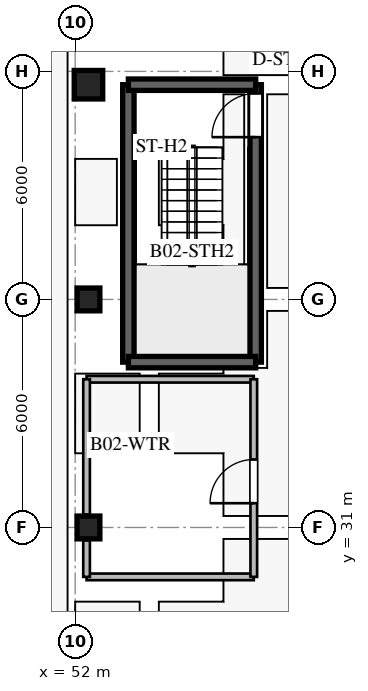
"""IFC4 building model, lengths in metres.
Left out: names, types, materials, properties, quantities, classifications, styles, units other than length and angle.
Written with IfcOpenShell. Run it as: python <this file> out.ifc"""

import sys

from ifc_helpers import new_model, si_unit, direction, frame, frame_2d, origin, origin_2d, place, context, subcontext, project, spatial, rectangle, extrude, element, fill, save


model = new_model("IFC4")
c1 = context("Model", 3, precision=1e-05, world=origin(), true_north=direction((0.0, 1.0)))
c2 = subcontext(c1, "Body", "Model", "MODEL_VIEW")
j1 = project(units=[si_unit("LENGTHUNIT", "METRE"), si_unit("PLANEANGLEUNIT", "RADIAN")], contexts=[c1])
p1 = place(None, origin())
s1 = spatial("IfcSite", under=j1, at=p1, CompositionType="ELEMENT")
p2 = place(p1, origin())
s2 = spatial("IfcBuilding", under=s1, at=p2, CompositionType="ELEMENT")
p3 = place(p2, frame((0.0, 0.0, -8.4)))
s3 = spatial("IfcBuildingStorey", under=s2, at=p3, CompositionType="ELEMENT", Elevation=-8.4)
p4 = place(p3, frame((56.75, 35.35, 0.0), z_axis=(0.0, 0.0, 1.0), x_axis=(0.0, 1.0, 0.0)))
e1 = element("IfcWall", 1, at=p4, inside=s3, PredefinedType="SOLIDWALL", context=c2, shape_type="SweptSolid", body=[
    extrude(rectangle(XDim=7.3, YDim=0.3, at=frame_2d((3.65, 0.0))), origin(), (0.0, 0.0, 1.0), 3.88),
])
p5 = place(p4, frame((5.92, 0.0, 0.0)))
e2 = element("IfcOpeningElement", 2, at=p5, cuts=e1, PredefinedType="OPENING", context=c2, shape_type="SweptSolid", body=[
    extrude(rectangle(XDim=1.15, YDim=2.2, at=frame_2d((0.575, 1.1))), frame((0.0, 0.16, 0.0), z_axis=(0.0, -1.0, 0.0), x_axis=(1.0, 0.0, 0.0)), (0.0, 0.0, 1.0), 0.32),
])
p6 = place(p3, frame((53.4, 35.35, 0.0), z_axis=(0.0, 0.0, 1.0), x_axis=(0.0, 1.0, 0.0)))
e3 = element("IfcWall", 3, at=p6, inside=s3, PredefinedType="SOLIDWALL", context=c2, shape_type="SweptSolid", body=[
    extrude(rectangle(XDim=7.3, YDim=0.3, at=frame_2d((3.65, 0.0))), origin(), (0.0, 0.0, 1.0), 3.88),
])
for number, where, z_axis, x_axis in (
    (4, (53.4, 35.35, 0.0), (0.0, 0.0, 1.0), (1.0, 0.0, 0.0)),
    (5, (53.4, 42.65, 0.0), (0.0, 0.0, 1.0), (1.0, 0.0, 0.0)),
):
    element("IfcWall", number, at=place(p3, frame(where, z_axis=z_axis, x_axis=x_axis)), inside=s3, PredefinedType="SOLIDWALL", context=c2, shape_type="SweptSolid", body=[
        extrude(rectangle(XDim=3.35, YDim=0.3, at=frame_2d((1.675, 0.0))), origin(), (0.0, 0.0, 1.0), 3.88),
    ])
for number, where, z_axis, x_axis in (
    (6, (52.35, 31.0, 0.0), (0.0, 0.0, 1.0), (1.0, 0.0, 0.0)),
    (7, (52.35, 37.0, 0.0), (0.0, 0.0, 1.0), (1.0, 0.0, 0.0)),
):
    element("IfcColumn", number, at=place(p3, frame(where, z_axis=z_axis, x_axis=x_axis)), inside=s3, PredefinedType="COLUMN", context=c2, shape_type="SweptSolid", body=[
        extrude(rectangle(XDim=0.6, YDim=0.6, at=origin_2d()), origin(), (0.0, 0.0, 1.0), 4.2),
    ])
p7 = place(p3, frame((52.35, 42.65, 0.0), z_axis=(0.0, 0.0, 1.0), x_axis=(1.0, 0.0, 0.0)))
e8 = element("IfcColumn", 8, at=p7, inside=s3, PredefinedType="COLUMN", context=c2, shape_type="SweptSolid", body=[
    extrude(rectangle(XDim=0.75, YDim=0.75, at=origin_2d()), origin(), (0.0, 0.0, 1.0), 4.2),
])
for number, where, z_axis, x_axis in (
    (9, (52.3, 34.9, 0.0), (0.0, 0.0, 1.0), (1.0, 0.0, 0.0)),
    (10, (52.3, 29.7, 0.0), (0.0, 0.0, 1.0), (1.0, 0.0, 0.0)),
):
    element("IfcWall", number, at=place(p3, frame(where, z_axis=z_axis, x_axis=x_axis)), inside=s3, PredefinedType="PARTITIONING", context=c2, shape_type="SweptSolid", body=[
        extrude(rectangle(XDim=4.4, YDim=0.175, at=frame_2d((2.2, 0.0))), origin(), (0.0, 0.0, 1.0), 3.52),
    ])
p8 = place(p3, frame((52.3, 29.7, 0.0), z_axis=(0.0, 0.0, 1.0), x_axis=(0.0, 1.0, 0.0)))
e11 = element("IfcWall", 11, at=p8, inside=s3, PredefinedType="PARTITIONING", context=c2, shape_type="SweptSolid", body=[
    extrude(rectangle(XDim=0.96, YDim=0.175, at=frame_2d((0.48, 0.0))), origin(), (0.0, 0.0, 1.0), 3.52),
])
p9 = place(p3, frame((52.3, 31.34, 0.0), z_axis=(0.0, 0.0, 1.0), x_axis=(0.0, 1.0, 0.0)))
e12 = element("IfcWall", 12, at=p9, inside=s3, PredefinedType="PARTITIONING", context=c2, shape_type="SweptSolid", body=[
    extrude(rectangle(XDim=3.56, YDim=0.175, at=frame_2d((1.78, 0.0))), origin(), (0.0, 0.0, 1.0), 3.52),
])
p10 = place(p3, frame((56.7, 29.7, 0.0), z_axis=(0.0, 0.0, 1.0), x_axis=(0.0, 1.0, 0.0)))
e13 = element("IfcWall", 13, at=p10, inside=s3, PredefinedType="PARTITIONING", context=c2, shape_type="SweptSolid", body=[
    extrude(rectangle(XDim=5.2, YDim=0.175, at=frame_2d((2.6, 0.0))), origin(), (0.0, 0.0, 1.0), 3.52),
])
p11 = place(p10, frame((1.938, 0.0, 0.0)))
e14 = element("IfcOpeningElement", 14, at=p11, cuts=e13, PredefinedType="OPENING", context=c2, shape_type="SweptSolid", body=[
    extrude(rectangle(XDim=1.15, YDim=2.2, at=frame_2d((0.575, 1.1))), frame((0.0, 0.098, 0.0), z_axis=(0.0, -1.0, 0.0), x_axis=(1.0, 0.0, 0.0)), (0.0, 0.0, 1.0), 0.195),
])
p12 = place(p5, origin())
e15 = element("IfcDoor", 15, at=p12, inside=s3, OperationType="SINGLE_SWING_LEFT", PredefinedType="DOOR", context=c2, shape_type="SweptSolid", body=[
    extrude(rectangle(XDim=1.15, YDim=2.2, at=frame_2d((0.575, 1.1))), frame((0.0, 0.025, 0.0), z_axis=(0.0, -1.0, 0.0), x_axis=(1.0, 0.0, 0.0)), (0.0, 0.0, 1.0), 0.05),
])
fill(e2, e15)
p13 = place(p11, origin())
e16 = element("IfcDoor", 16, at=p13, inside=s3, OperationType="SINGLE_SWING_LEFT", PredefinedType="DOOR", context=c2, shape_type="SweptSolid", body=[
    extrude(rectangle(XDim=1.15, YDim=2.2, at=frame_2d((0.575, 1.1))), frame((0.0, 0.025, 0.0), z_axis=(0.0, -1.0, 0.0), x_axis=(1.0, 0.0, 0.0)), (0.0, 0.0, 1.0), 0.05),
])
fill(e14, e16)
save(model, sys.argv[1])
